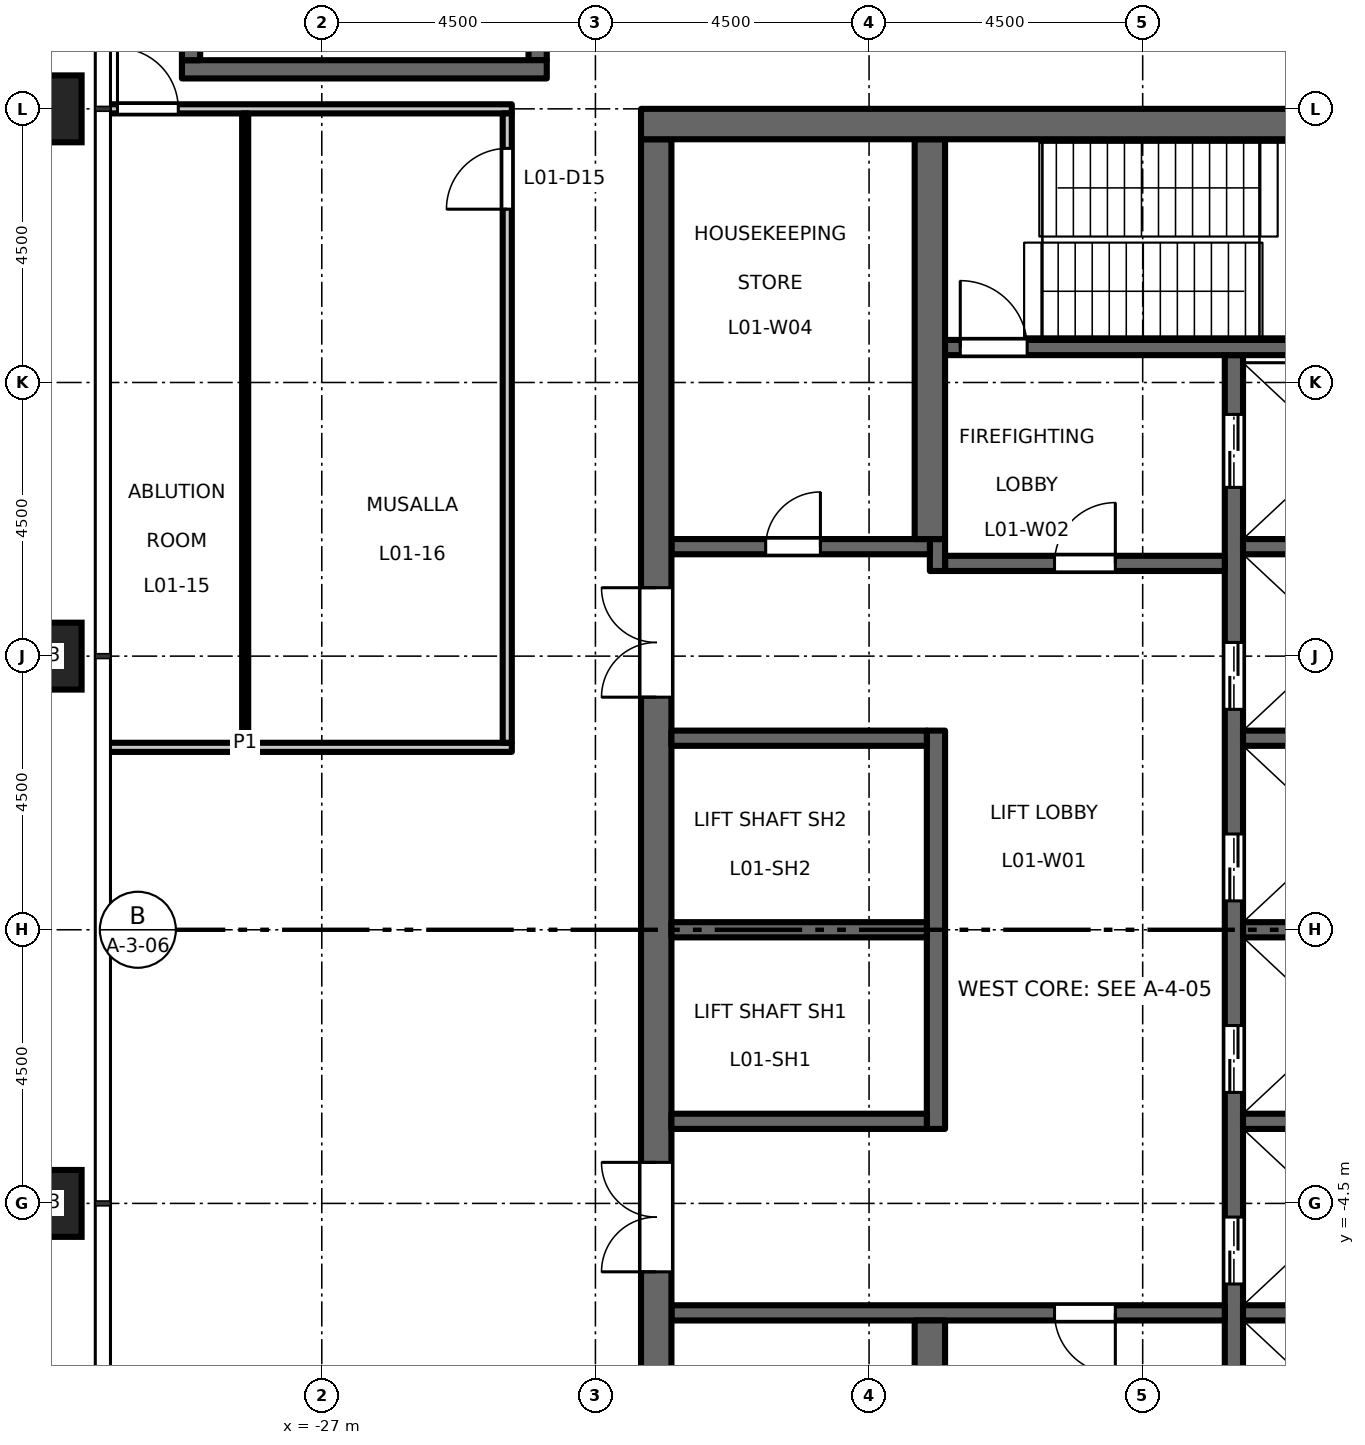
"""IFC4 building model, lengths in metres.
Left out: names, types, materials, properties, quantities, classifications, styles, units other than length and angle.
Written with IfcOpenShell. Run it as: python <this file> out.ifc"""

import sys

from ifc_helpers import new_model, si_unit, direction, frame, frame_2d, origin, origin_2d, place, context, subcontext, project, spatial, rectangle, hollow_rectangle, extrude, element, fill, save


model = new_model("IFC4")
c1 = context("Model", 3, precision=1e-05, world=origin(), true_north=direction((0.0, 1.0)))
c2 = subcontext(c1, "Body", "Model", "MODEL_VIEW")
j1 = project(units=[si_unit("LENGTHUNIT", "METRE"), si_unit("PLANEANGLEUNIT", "RADIAN")], contexts=[c1])
p1 = place(None, origin())
s1 = spatial("IfcSite", under=j1, at=p1, CompositionType="ELEMENT")
p2 = place(p1, origin())
s2 = spatial("IfcBuilding", under=s1, at=p2, CompositionType="ELEMENT")
p3 = place(p2, frame((0.0, 0.0, 7.2)))
s3 = spatial("IfcBuildingStorey", under=s2, at=p3, CompositionType="ELEMENT", Elevation=7.2)
for number, where, z_axis, x_axis in (
    (1, (-31.5, 13.5, 0.0), (0.0, 0.0, 1.0), (1.0, 0.0, 0.0)),
    (2, (-31.5, 4.5, 0.0), (0.0, 0.0, 1.0), (1.0, 0.0, 0.0)),
    (3, (-31.5, -4.5, 0.0), (0.0, 0.0, 1.0), (1.0, 0.0, 0.0)),
):
    element("IfcColumn", number, at=place(p3, frame(where, z_axis=z_axis, x_axis=x_axis)), inside=s3, PredefinedType="COLUMN", context=c2, shape_type="SweptSolid", body=[
        extrude(hollow_rectangle(XDim=1.1, YDim=1.1, WallThickness=0.07, at=origin_2d()), origin(), (0.0, 0.0, 1.0), 5.0),
    ])
p4 = place(p3, frame((-12.0, -9.45, 0.0), z_axis=(0.0, 0.0, 1.0), x_axis=(0.0, 1.0, 0.0)))
e4 = element("IfcWall", 4, at=p4, inside=s3, PredefinedType="SHEAR", context=c2, shape_type="SweptSolid", body=[
    extrude(rectangle(XDim=18.9, YDim=0.3, at=frame_2d((9.45, 0.0))), origin(), (0.0, 0.0, 1.0), 4.8),
])
p5 = place(p4, frame((3.625, 0.0, 0.0)))
e5 = element("IfcOpeningElement", 5, at=p5, cuts=e4, PredefinedType="OPENING", context=c2, shape_type="SweptSolid", body=[
    extrude(rectangle(XDim=1.1, YDim=2.1, at=frame_2d((0.55, 1.05))), frame((0.0, 0.16, 0.0), z_axis=(0.0, -1.0, 0.0), x_axis=(1.0, 0.0, 0.0)), (0.0, 0.0, 1.0), 0.32),
])
p6 = place(p4, frame((6.775, 0.0, 0.0)))
e6 = element("IfcOpeningElement", 6, at=p6, cuts=e4, PredefinedType="OPENING", context=c2, shape_type="SweptSolid", body=[
    extrude(rectangle(XDim=1.1, YDim=2.1, at=frame_2d((0.55, 1.05))), frame((0.0, 0.16, 0.0), z_axis=(0.0, -1.0, 0.0), x_axis=(1.0, 0.0, 0.0)), (0.0, 0.0, 1.0), 0.32),
])
p7 = place(p4, frame((9.925, 0.0, 0.0)))
e7 = element("IfcOpeningElement", 7, at=p7, cuts=e4, PredefinedType="OPENING", context=c2, shape_type="SweptSolid", body=[
    extrude(rectangle(XDim=1.1, YDim=2.1, at=frame_2d((0.55, 1.05))), frame((0.0, 0.16, 0.0), z_axis=(0.0, -1.0, 0.0), x_axis=(1.0, 0.0, 0.0)), (0.0, 0.0, 1.0), 0.32),
])
p8 = place(p4, frame((13.075, 0.0, 0.0)))
e8 = element("IfcOpeningElement", 8, at=p8, cuts=e4, PredefinedType="OPENING", context=c2, shape_type="SweptSolid", body=[
    extrude(rectangle(XDim=1.1, YDim=2.1, at=frame_2d((0.55, 1.05))), frame((0.0, 0.16, 0.0), z_axis=(0.0, -1.0, 0.0), x_axis=(1.0, 0.0, 0.0)), (0.0, 0.0, 1.0), 0.32),
])
p9 = place(p4, frame((16.725, 0.0, 0.0)))
e9 = element("IfcOpeningElement", 9, at=p9, cuts=e4, PredefinedType="OPENING", context=c2, shape_type="SweptSolid", body=[
    extrude(rectangle(XDim=1.2, YDim=2.1, at=frame_2d((0.6, 1.05))), frame((0.0, 0.16, 0.0), z_axis=(0.0, -1.0, 0.0), x_axis=(1.0, 0.0, 0.0)), (0.0, 0.0, 1.0), 0.32),
])
p10 = place(p4, frame((0.975, 0.0, 0.0)))
e10 = element("IfcOpeningElement", 10, at=p10, cuts=e4, PredefinedType="OPENING", context=c2, shape_type="SweptSolid", body=[
    extrude(rectangle(XDim=1.2, YDim=2.1, at=frame_2d((0.6, 1.05))), frame((0.0, 0.16, 0.0), z_axis=(0.0, -1.0, 0.0), x_axis=(1.0, 0.0, 0.0)), (0.0, 0.0, 1.0), 0.32),
])
p11 = place(p3, frame((-12.15, 6.025, 0.0), z_axis=(0.0, 0.0, 1.0), x_axis=(-1.0, 0.0, 0.0)))
e11 = element("IfcWall", 11, at=p11, inside=s3, PredefinedType="SHEAR", context=c2, shape_type="SweptSolid", body=[
    extrude(rectangle(XDim=4.6, YDim=0.25, at=frame_2d((2.3, 0.0))), origin(), (0.0, 0.0, 1.0), 4.8),
])
p12 = place(p11, frame((1.8, 0.0, 0.0)))
e12 = element("IfcOpeningElement", 12, at=p12, cuts=e11, PredefinedType="OPENING", context=c2, shape_type="SweptSolid", body=[
    extrude(rectangle(XDim=1.0, YDim=2.1, at=frame_2d((0.5, 1.05))), frame((0.0, 0.135, 0.0), z_axis=(0.0, -1.0, 0.0), x_axis=(1.0, 0.0, 0.0)), (0.0, 0.0, 1.0), 0.27),
])
p13 = place(p3, frame((-16.875, 5.9, 0.0), z_axis=(0.0, 0.0, 1.0), x_axis=(0.0, 1.0, 0.0)))
e13 = element("IfcWall", 13, at=p13, inside=s3, PredefinedType="SHEAR", context=c2, shape_type="SweptSolid", body=[
    extrude(rectangle(XDim=0.525, YDim=0.25, at=frame_2d((0.263, 0.0))), origin(), (0.0, 0.0, 1.0), 4.8),
])
p14 = place(p3, frame((-17.0, 6.3, 0.0), z_axis=(0.0, 0.0, 1.0), x_axis=(-1.0, 0.0, 0.0)))
e14 = element("IfcWall", 14, at=p14, inside=s3, PredefinedType="SHEAR", context=c2, shape_type="SweptSolid", body=[
    extrude(rectangle(XDim=4.25, YDim=0.25, at=frame_2d((2.125, 0.0))), origin(), (0.0, 0.0, 1.0), 4.8),
])
p15 = place(p14, frame((1.8, 0.0, 0.0)))
e15 = element("IfcOpeningElement", 15, at=p15, cuts=e14, PredefinedType="OPENING", context=c2, shape_type="SweptSolid", body=[
    extrude(rectangle(XDim=0.9, YDim=2.1, at=frame_2d((0.45, 1.05))), frame((0.0, 0.135, 0.0), z_axis=(0.0, -1.0, 0.0), x_axis=(1.0, 0.0, 0.0)), (0.0, 0.0, 1.0), 0.27),
])
p16 = place(p3, frame((-12.15, -6.3, 0.0), z_axis=(0.0, 0.0, 1.0), x_axis=(-1.0, 0.0, 0.0)))
e16 = element("IfcWall", 16, at=p16, inside=s3, PredefinedType="SHEAR", context=c2, shape_type="SweptSolid", body=[
    extrude(rectangle(XDim=9.1, YDim=0.25, at=frame_2d((4.55, 0.0))), origin(), (0.0, 0.0, 1.0), 4.8),
])
p17 = place(p16, frame((1.8, 0.0, 0.0)))
e17 = element("IfcOpeningElement", 17, at=p17, cuts=e16, PredefinedType="OPENING", context=c2, shape_type="SweptSolid", body=[
    extrude(rectangle(XDim=1.0, YDim=2.1, at=frame_2d((0.5, 1.05))), frame((0.0, 0.135, 0.0), z_axis=(0.0, -1.0, 0.0), x_axis=(1.0, 0.0, 0.0)), (0.0, 0.0, 1.0), 0.27),
])
p18 = place(p3, frame((-21.5, -13.0, 0.0), z_axis=(0.0, 0.0, 1.0), x_axis=(0.0, 1.0, 0.0)))
e18 = element("IfcWall", 18, at=p18, inside=s3, PredefinedType="SHEAR", context=c2, shape_type="SweptSolid", body=[
    extrude(rectangle(XDim=26.0, YDim=0.5, at=frame_2d((13.0, 0.0))), origin(), (0.0, 0.0, 1.0), 4.8),
])
p19 = place(p18, frame((16.825, 0.0, 0.0)))
e19 = element("IfcOpeningElement", 19, at=p19, cuts=e18, PredefinedType="OPENING", context=c2, shape_type="SweptSolid", body=[
    extrude(rectangle(XDim=1.8, YDim=2.1, at=frame_2d((0.9, 1.05))), frame((0.0, 0.26, 0.0), z_axis=(0.0, -1.0, 0.0), x_axis=(1.0, 0.0, 0.0)), (0.0, 0.0, 1.0), 0.52),
])
p20 = place(p18, frame((7.375, 0.0, 0.0)))
e20 = element("IfcOpeningElement", 20, at=p20, cuts=e18, PredefinedType="OPENING", context=c2, shape_type="SweptSolid", body=[
    extrude(rectangle(XDim=1.8, YDim=2.1, at=frame_2d((0.9, 1.05))), frame((0.0, 0.26, 0.0), z_axis=(0.0, -1.0, 0.0), x_axis=(1.0, 0.0, 0.0)), (0.0, 0.0, 1.0), 0.52),
])
p21 = place(p18, frame((2.65, 0.0, 0.0)))
e21 = element("IfcOpeningElement", 21, at=p21, cuts=e18, PredefinedType="OPENING", context=c2, shape_type="SweptSolid", body=[
    extrude(rectangle(XDim=0.9, YDim=2.1, at=frame_2d((0.45, 1.05))), frame((0.0, 0.26, 0.0), z_axis=(0.0, -1.0, 0.0), x_axis=(1.0, 0.0, 0.0)), (0.0, 0.0, 1.0), 0.52),
])
p22 = place(p3, frame((-16.9, -3.275, 0.0), z_axis=(0.0, 0.0, 1.0), x_axis=(0.0, 1.0, 0.0)))
e22 = element("IfcWall", 22, at=p22, inside=s3, PredefinedType="SHEAR", context=c2, shape_type="SweptSolid", body=[
    extrude(rectangle(XDim=6.55, YDim=0.3, at=frame_2d((3.275, 0.0))), origin(), (0.0, 0.0, 1.0), 4.8),
])
for number, where, z_axis, x_axis in (
    (23, (-17.05, 0.0, 0.0), (0.0, 0.0, 1.0), (-1.0, 0.0, 0.0)),
    (24, (-17.05, 3.15, 0.0), (0.0, 0.0, 1.0), (-1.0, 0.0, 0.0)),
    (25, (-17.05, -3.15, 0.0), (0.0, 0.0, 1.0), (-1.0, 0.0, 0.0)),
):
    element("IfcWall", number, at=place(p3, frame(where, z_axis=z_axis, x_axis=x_axis)), inside=s3, PredefinedType="SHEAR", context=c2, shape_type="SweptSolid", body=[
        extrude(rectangle(XDim=4.2, YDim=0.25, at=frame_2d((2.1, 0.0))), origin(), (0.0, 0.0, 1.0), 4.8),
    ])
for number, where, z_axis, x_axis in (
    (26, (-17.0, 6.425, 0.0), (0.0, 0.0, 1.0), (0.0, 1.0, 0.0)),
    (27, (-17.0, -13.0, 0.0), (0.0, 0.0, 1.0), (0.0, 1.0, 0.0)),
):
    element("IfcWall", number, at=place(p3, frame(where, z_axis=z_axis, x_axis=x_axis)), inside=s3, PredefinedType="SHEAR", context=c2, shape_type="SweptSolid", body=[
        extrude(rectangle(XDim=6.575, YDim=0.5, at=frame_2d((3.288, 0.0))), origin(), (0.0, 0.0, 1.0), 4.8),
    ])
for number, where, z_axis, x_axis in (
    (28, (-8.75, 0.0, 0.0), (0.0, 0.0, 1.0), (-1.0, 0.0, 0.0)),
    (29, (-8.75, 3.15, 0.0), (0.0, 0.0, 1.0), (-1.0, 0.0, 0.0)),
    (30, (-8.75, 6.3, 0.0), (0.0, 0.0, 1.0), (-1.0, 0.0, 0.0)),
    (31, (-8.75, -3.15, 0.0), (0.0, 0.0, 1.0), (-1.0, 0.0, 0.0)),
    (32, (-8.75, -6.3, 0.0), (0.0, 0.0, 1.0), (-1.0, 0.0, 0.0)),
):
    element("IfcWall", number, at=place(p3, frame(where, z_axis=z_axis, x_axis=x_axis)), inside=s3, PredefinedType="SHEAR", context=c2, shape_type="SweptSolid", body=[
        extrude(rectangle(XDim=3.1, YDim=0.25, at=frame_2d((1.55, 0.0))), origin(), (0.0, 0.0, 1.0), 4.8),
    ])
p23 = place(p3, frame((-8.75, 9.575, 0.0), z_axis=(0.0, 0.0, 1.0), x_axis=(-1.0, 0.0, 0.0)))
e33 = element("IfcWall", 33, at=p23, inside=s3, PredefinedType="SHEAR", context=c2, shape_type="SweptSolid", body=[
    extrude(rectangle(XDim=8.0, YDim=0.25, at=frame_2d((4.0, 0.0))), origin(), (0.0, 0.0, 1.0), 4.8),
])
p24 = place(p23, frame((6.65, 0.0, 0.0)))
e34 = element("IfcOpeningElement", 34, at=p24, cuts=e33, PredefinedType="OPENING", context=c2, shape_type="SweptSolid", body=[
    extrude(rectangle(XDim=1.1, YDim=2.1, at=frame_2d((0.55, 1.05))), frame((0.0, 0.135, 0.0), z_axis=(0.0, -1.0, 0.0), x_axis=(1.0, 0.0, 0.0)), (0.0, 0.0, 1.0), 0.27),
])
p25 = place(p3, frame((-8.25, 13.25, 0.0), z_axis=(0.0, 0.0, 1.0), x_axis=(-1.0, 0.0, 0.0)))
e35 = element("IfcWall", 35, at=p25, inside=s3, PredefinedType="SHEAR", context=c2, shape_type="SweptSolid", body=[
    extrude(rectangle(XDim=13.5, YDim=0.5, at=frame_2d((6.75, 0.0))), origin(), (0.0, 0.0, 1.0), 4.8),
])
p26 = place(p3, frame((-23.45, 14.3, 0.0), z_axis=(0.0, 0.0, 1.0), x_axis=(0.0, 1.0, 0.0)))
e36 = element("IfcWall", 36, at=p26, inside=s3, PredefinedType="SHEAR", context=c2, shape_type="SweptSolid", body=[
    extrude(rectangle(XDim=10.2, YDim=0.3, at=frame_2d((5.1, 0.0))), origin(), (0.0, 0.0, 1.0), 4.8),
])
p27 = place(p26, frame((0.2, 0.0, 0.0)))
e37 = element("IfcOpeningElement", 37, at=p27, cuts=e36, PredefinedType="OPENING", context=c2, shape_type="SweptSolid", body=[
    extrude(rectangle(XDim=1.8, YDim=2.1, at=frame_2d((0.9, 1.05))), frame((0.0, 0.16, 0.0), z_axis=(0.0, -1.0, 0.0), x_axis=(1.0, 0.0, 0.0)), (0.0, 0.0, 1.0), 0.32),
])
p28 = place(p3, frame((-29.3, 14.15, 0.0), z_axis=(0.0, 0.0, 1.0), x_axis=(1.0, 0.0, 0.0)))
e38 = element("IfcWall", 38, at=p28, inside=s3, PredefinedType="SHEAR", context=c2, shape_type="SweptSolid", body=[
    extrude(rectangle(XDim=6.0, YDim=0.3, at=frame_2d((3.0, 0.0))), origin(), (0.0, 0.0, 1.0), 4.8),
])
p29 = place(p3, frame((-29.15, 14.3, 0.0), z_axis=(0.0, 0.0, 1.0), x_axis=(0.0, 1.0, 0.0)))
e39 = element("IfcWall", 39, at=p29, inside=s3, PredefinedType="SHEAR", context=c2, shape_type="SweptSolid", body=[
    extrude(rectangle(XDim=10.2, YDim=0.3, at=frame_2d((5.1, 0.0))), origin(), (0.0, 0.0, 1.0), 4.8),
])
p30 = place(p3, frame((-30.51, 3.0, 0.0), z_axis=(0.0, 0.0, 1.0), x_axis=(1.0, 0.0, 0.0)))
e40 = element("IfcWall", 40, at=p30, inside=s3, PredefinedType="PARTITIONING", context=c2, shape_type="SweptSolid", body=[
    extrude(rectangle(XDim=6.635, YDim=0.15, at=frame_2d((3.317, 0.0))), origin(), (0.0, 0.0, 1.0), 4.8),
])
p31 = place(p3, frame((-30.51, 13.5, 0.0), z_axis=(0.0, 0.0, 1.0), x_axis=(1.0, 0.0, 0.0)))
e41 = element("IfcWall", 41, at=p31, inside=s3, PredefinedType="PARTITIONING", context=c2, shape_type="SweptSolid", body=[
    extrude(rectangle(XDim=6.635, YDim=0.15, at=frame_2d((3.317, 0.0))), origin(), (0.0, 0.0, 1.0), 3.8),
])
p32 = place(p31, frame((0.15, 0.0, 0.0)))
e42 = element("IfcOpeningElement", 42, at=p32, cuts=e41, PredefinedType="OPENING", context=c2, shape_type="SweptSolid", body=[
    extrude(rectangle(XDim=1.0, YDim=2.1, at=frame_2d((0.5, 1.05))), frame((0.0, 0.085, 0.0), z_axis=(0.0, -1.0, 0.0), x_axis=(1.0, 0.0, 0.0)), (0.0, 0.0, 1.0), 0.17),
])
p33 = place(p3, frame((-28.26, 3.075, 0.0), z_axis=(0.0, 0.0, 1.0), x_axis=(0.0, 1.0, 0.0)))
e43 = element("IfcWall", 43, at=p33, inside=s3, PredefinedType="PARTITIONING", context=c2, shape_type="SweptSolid", body=[
    extrude(rectangle(XDim=10.35, YDim=0.1, at=frame_2d((5.175, 0.0))), origin(), (0.0, 0.0, 1.0), 4.8),
])
p34 = place(p3, frame((-23.95, 3.075, 0.0), z_axis=(0.0, 0.0, 1.0), x_axis=(0.0, 1.0, 0.0)))
e44 = element("IfcWall", 44, at=p34, inside=s3, PredefinedType="PARTITIONING", context=c2, shape_type="SweptSolid", body=[
    extrude(rectangle(XDim=10.35, YDim=0.15, at=frame_2d((5.175, 0.0))), origin(), (0.0, 0.0, 1.0), 4.8),
])
p35 = place(p34, frame((8.775, 0.0, 0.0)))
e45 = element("IfcOpeningElement", 45, at=p35, cuts=e44, PredefinedType="OPENING", context=c2, shape_type="SweptSolid", body=[
    extrude(rectangle(XDim=1.0, YDim=2.1, at=frame_2d((0.5, 1.05))), frame((0.0, 0.085, 0.0), z_axis=(0.0, -1.0, 0.0), x_axis=(1.0, 0.0, 0.0)), (0.0, 0.0, 1.0), 0.17),
])
p36 = place(p12, origin())
e46 = element("IfcDoor", 46, at=p36, inside=s3, OperationType="SINGLE_SWING_LEFT", PredefinedType="DOOR", context=c2, shape_type="SweptSolid", body=[
    extrude(rectangle(XDim=1.0, YDim=2.1, at=frame_2d((0.5, 1.05))), frame((0.0, 0.025, 0.0), z_axis=(0.0, -1.0, 0.0), x_axis=(1.0, 0.0, 0.0)), (0.0, 0.0, 1.0), 0.05),
])
fill(e12, e46)
p37 = place(p17, origin())
e47 = element("IfcDoor", 47, at=p37, inside=s3, OperationType="SINGLE_SWING_RIGHT", PredefinedType="DOOR", context=c2, shape_type="SweptSolid", body=[
    extrude(rectangle(XDim=1.0, YDim=2.1, at=frame_2d((0.5, 1.05))), frame((0.0, 0.025, 0.0), z_axis=(0.0, -1.0, 0.0), x_axis=(1.0, 0.0, 0.0)), (0.0, 0.0, 1.0), 0.05),
])
fill(e17, e47)
p38 = place(p24, origin())
e48 = element("IfcDoor", 48, at=p38, inside=s3, OperationType="SINGLE_SWING_RIGHT", PredefinedType="DOOR", context=c2, shape_type="SweptSolid", body=[
    extrude(rectangle(XDim=1.1, YDim=2.1, at=frame_2d((0.55, 1.05))), frame((0.0, 0.025, 0.0), z_axis=(0.0, -1.0, 0.0), x_axis=(1.0, 0.0, 0.0)), (0.0, 0.0, 1.0), 0.05),
])
fill(e34, e48)
p39 = place(p19, origin())
e49 = element("IfcDoor", 49, at=p39, inside=s3, OperationType="DOUBLE_DOOR_DOUBLE_SWING", PredefinedType="DOOR", context=c2, shape_type="SweptSolid", body=[
    extrude(rectangle(XDim=1.8, YDim=2.1, at=frame_2d((0.9, 1.05))), frame((0.0, 0.025, 0.0), z_axis=(0.0, -1.0, 0.0), x_axis=(1.0, 0.0, 0.0)), (0.0, 0.0, 1.0), 0.05),
])
fill(e19, e49)
p40 = place(p20, origin())
e50 = element("IfcDoor", 50, at=p40, inside=s3, OperationType="DOUBLE_DOOR_DOUBLE_SWING", PredefinedType="DOOR", context=c2, shape_type="SweptSolid", body=[
    extrude(rectangle(XDim=1.8, YDim=2.1, at=frame_2d((0.9, 1.05))), frame((0.0, 0.025, 0.0), z_axis=(0.0, -1.0, 0.0), x_axis=(1.0, 0.0, 0.0)), (0.0, 0.0, 1.0), 0.05),
])
fill(e20, e50)
p41 = place(p5, origin())
e51 = element("IfcDoor", 51, at=p41, inside=s3, OperationType="DOUBLE_DOOR_SLIDING", PredefinedType="DOOR", context=c2, shape_type="SweptSolid", body=[
    extrude(rectangle(XDim=1.1, YDim=2.1, at=frame_2d((0.55, 1.05))), frame((0.0, 0.025, 0.0), z_axis=(0.0, -1.0, 0.0), x_axis=(1.0, 0.0, 0.0)), (0.0, 0.0, 1.0), 0.05),
])
fill(e5, e51)
p42 = place(p6, origin())
e52 = element("IfcDoor", 52, at=p42, inside=s3, OperationType="DOUBLE_DOOR_SLIDING", PredefinedType="DOOR", context=c2, shape_type="SweptSolid", body=[
    extrude(rectangle(XDim=1.1, YDim=2.1, at=frame_2d((0.55, 1.05))), frame((0.0, 0.025, 0.0), z_axis=(0.0, -1.0, 0.0), x_axis=(1.0, 0.0, 0.0)), (0.0, 0.0, 1.0), 0.05),
])
fill(e6, e52)
p43 = place(p7, origin())
e53 = element("IfcDoor", 53, at=p43, inside=s3, OperationType="DOUBLE_DOOR_SLIDING", PredefinedType="DOOR", context=c2, shape_type="SweptSolid", body=[
    extrude(rectangle(XDim=1.1, YDim=2.1, at=frame_2d((0.55, 1.05))), frame((0.0, 0.025, 0.0), z_axis=(0.0, -1.0, 0.0), x_axis=(1.0, 0.0, 0.0)), (0.0, 0.0, 1.0), 0.05),
])
fill(e7, e53)
p44 = place(p8, origin())
e54 = element("IfcDoor", 54, at=p44, inside=s3, OperationType="DOUBLE_DOOR_SLIDING", PredefinedType="DOOR", context=c2, shape_type="SweptSolid", body=[
    extrude(rectangle(XDim=1.1, YDim=2.1, at=frame_2d((0.55, 1.05))), frame((0.0, 0.025, 0.0), z_axis=(0.0, -1.0, 0.0), x_axis=(1.0, 0.0, 0.0)), (0.0, 0.0, 1.0), 0.05),
])
fill(e8, e54)
p45 = place(p9, origin())
e55 = element("IfcDoor", 55, at=p45, inside=s3, OperationType="DOUBLE_DOOR_SLIDING", PredefinedType="DOOR", context=c2, shape_type="SweptSolid", body=[
    extrude(rectangle(XDim=1.2, YDim=2.1, at=frame_2d((0.6, 1.05))), frame((0.0, 0.025, 0.0), z_axis=(0.0, -1.0, 0.0), x_axis=(1.0, 0.0, 0.0)), (0.0, 0.0, 1.0), 0.05),
])
fill(e9, e55)
p46 = place(p15, origin())
e56 = element("IfcDoor", 56, at=p46, inside=s3, OperationType="SINGLE_SWING_LEFT", PredefinedType="DOOR", context=c2, shape_type="SweptSolid", body=[
    extrude(rectangle(XDim=0.9, YDim=2.1, at=frame_2d((0.45, 1.05))), frame((0.0, 0.025, 0.0), z_axis=(0.0, -1.0, 0.0), x_axis=(1.0, 0.0, 0.0)), (0.0, 0.0, 1.0), 0.05),
])
fill(e15, e56)
p47 = place(p32, origin())
e57 = element("IfcDoor", 57, at=p47, inside=s3, OperationType="SINGLE_SWING_LEFT", PredefinedType="DOOR", context=c2, shape_type="SweptSolid", body=[
    extrude(rectangle(XDim=1.0, YDim=2.1, at=frame_2d((0.5, 1.05))), frame((0.0, 0.025, 0.0), z_axis=(0.0, -1.0, 0.0), x_axis=(1.0, 0.0, 0.0)), (0.0, 0.0, 1.0), 0.05),
])
fill(e42, e57)
p48 = place(p35, origin())
e58 = element("IfcDoor", 58, at=p48, inside=s3, OperationType="SINGLE_SWING_LEFT", PredefinedType="DOOR", context=c2, shape_type="SweptSolid", body=[
    extrude(rectangle(XDim=1.0, YDim=2.1, at=frame_2d((0.5, 1.05))), frame((0.0, 0.025, 0.0), z_axis=(0.0, -1.0, 0.0), x_axis=(1.0, 0.0, 0.0)), (0.0, 0.0, 1.0), 0.05),
])
fill(e45, e58)
save(model, sys.argv[1])
